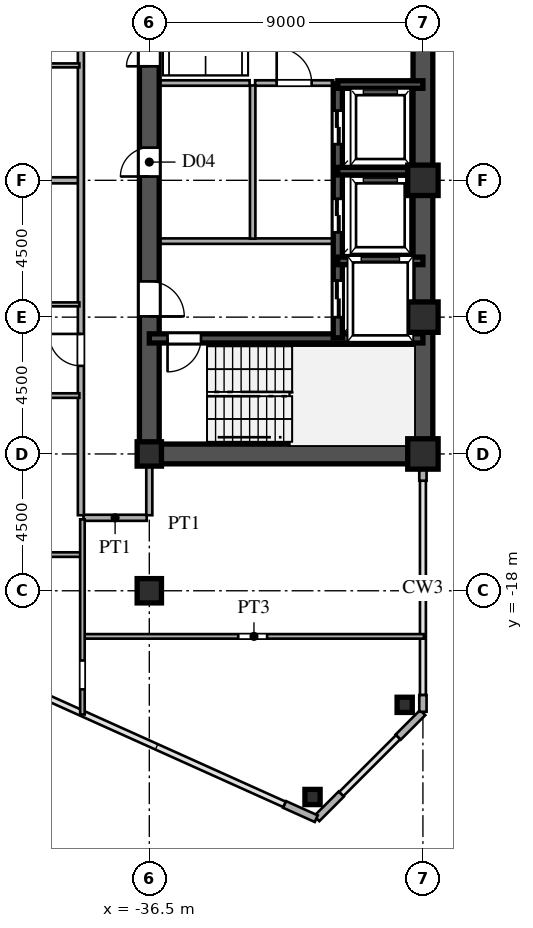
"""IFC4 building model, lengths in metres.
Left out: names, types, materials, properties, quantities, classifications, styles, units other than length and angle.
Written with IfcOpenShell. Run it as: python <this file> out.ifc"""

import sys

from ifc_helpers import new_model, si_unit, direction, frame, frame_2d, origin, origin_2d, place, context, subcontext, project, spatial, rectangle, hollow_rectangle, i_section, extrude, source, transform, mapped, element, fill, save


model = new_model("IFC4")
c1 = context("Model", 3, precision=1e-05, world=origin(), true_north=direction((0.0, 1.0)))
c2 = subcontext(c1, "Body", "Model", "MODEL_VIEW")
j1 = project(units=[si_unit("LENGTHUNIT", "METRE"), si_unit("PLANEANGLEUNIT", "RADIAN")], contexts=[c1])
p1 = place(None, origin())
s1 = spatial("IfcSite", under=j1, at=p1, CompositionType="ELEMENT")
p2 = place(p1, origin())
s2 = spatial("IfcBuilding", under=s1, at=p2, CompositionType="ELEMENT")
p3 = place(p2, frame((0.0, 0.0, 65.7)))
s3 = spatial("IfcBuildingStorey", under=s2, at=p3, CompositionType="ELEMENT", Elevation=65.7)
m1 = source(origin(), c2, "Body", "SweptSolid", [
    extrude(hollow_rectangle(XDim=1.0, YDim=1.0, WallThickness=0.042, at=origin_2d()), origin(), (0.0, 0.0, 1.0), 3.6),
])
for number, where, z_axis, x_axis in (
    (1, (-27.5, -13.5, 0.0), (0.0, 0.0, 1.0), (1.0, 0.0, 0.0)),
    (2, (-27.5, -9.0, 0.0), (0.0, 0.0, 1.0), (1.0, 0.0, 0.0)),
    (3, (-27.5, -4.5, 0.0), (0.0, 0.0, 1.0), (1.0, 0.0, 0.0)),
):
    element("IfcColumn", number, at=place(p3, frame(where, z_axis=z_axis, x_axis=x_axis)), inside=s3, PredefinedType="COLUMN", context=c2, shape_type="MappedRepresentation", body=[
        mapped(m1, transform((0.0, 0.0, 0.0), scale=1.0)),
    ])
m2 = source(origin(), c2, "Body", "SweptSolid", [
    extrude(i_section(OverallWidth=0.8, OverallDepth=0.8, WebThickness=0.032, FlangeThickness=0.05, at=origin_2d()), origin(), (0.0, 0.0, 1.0), 3.6),
])
for number, where, z_axis, x_axis in (
    (4, (-36.5, -18.0, 0.0), (0.0, 0.0, 1.0), (1.0, 0.0, 0.0)),
    (5, (-36.5, -13.5, 0.0), (0.0, 0.0, 1.0), (1.0, 0.0, 0.0)),
):
    element("IfcColumn", number, at=place(p3, frame(where, z_axis=z_axis, x_axis=x_axis)), inside=s3, PredefinedType="COLUMN", context=c2, shape_type="MappedRepresentation", body=[
        mapped(m2, transform((0.0, 0.0, 0.0), scale=1.0)),
    ])
m3 = source(origin(), c2, "Body", "SweptSolid", [
    extrude(hollow_rectangle(XDim=0.5, YDim=0.5, WallThickness=0.02, at=origin_2d()), origin(), (0.0, 0.0, 1.0), 3.6),
])
for number, where, z_axis, x_axis in (
    (6, (-28.1, -21.751, 0.0), (0.0, 0.0, 1.0), (1.0, 0.0, 0.0)),
    (7, (-31.131, -24.783, 0.0), (0.0, 0.0, 1.0), (1.0, 0.0, 0.0)),
):
    element("IfcColumn", number, at=place(p3, frame(where, z_axis=z_axis, x_axis=x_axis)), inside=s3, PredefinedType="COLUMN", context=c2, shape_type="MappedRepresentation", body=[
        mapped(m3, transform((0.0, 0.0, 0.0), scale=1.0)),
    ])
p4 = place(p3, frame((-27.5, -21.98, 0.0), z_axis=(0.0, 0.0, 1.0), x_axis=(0.0, 1.0, 0.0)))
e8 = element("IfcWall", 8, at=p4, inside=s3, PredefinedType="SOLIDWALL", context=c2, shape_type="SweptSolid", body=[
    extrude(rectangle(XDim=0.55, YDim=0.24, at=frame_2d((0.275, 0.0))), origin(), (0.0, 0.0, 1.0), 3.38),
])
p5 = place(p3, frame((-27.5, -14.38, 0.0), z_axis=(0.0, 0.0, 1.0), x_axis=(0.0, 1.0, 0.0)))
e9 = element("IfcWall", 9, at=p5, inside=s3, PredefinedType="SOLIDWALL", context=c2, shape_type="SweptSolid", body=[
    extrude(rectangle(XDim=0.55, YDim=0.24, at=frame_2d((0.275, 0.0))), origin(), (0.0, 0.0, 1.0), 2.88),
])
p6 = place(p3, frame((-32.049, -25.028, 0.0), z_axis=(0.0, 0.0, 1.0), x_axis=(0.911929519623, -0.410346866979, 0.0)))
e10 = element("IfcWall", 10, at=p6, inside=s3, PredefinedType="SOLIDWALL", context=c2, shape_type="SweptSolid", body=[
    extrude(rectangle(XDim=1.14, YDim=0.24, at=frame_2d((0.57, 0.0))), origin(), (0.0, 0.0, 1.0), 3.38),
])
for number, where, z_axis, x_axis in (
    (11, (-30.993, -25.493, 0.0), (0.0, 0.0, 1.0), (0.707, 0.707, 0.0)),
    (12, (-28.313, -22.813, 0.0), (0.0, 0.0, 1.0), (0.707, 0.707, 0.0)),
):
    element("IfcWall", number, at=place(p3, frame(where, z_axis=z_axis, x_axis=x_axis)), inside=s3, PredefinedType="SOLIDWALL", context=c2, shape_type="SweptSolid", body=[
        extrude(rectangle(XDim=1.14, YDim=0.24, at=frame_2d((0.57, 0.0))), origin(), (0.0, 0.0, 1.0), 3.38),
    ])
p7 = place(p3, frame((-27.5, -13.5, 0.0), z_axis=(0.0, 0.0, 1.0), x_axis=(0.0, 1.0, 0.0)))
e13 = element("IfcWall", 13, at=p7, inside=s3, PredefinedType="SHEAR", context=c2, shape_type="SweptSolid", body=[
    extrude(rectangle(XDim=12.2, YDim=0.65, at=frame_2d((6.1, 0.0))), origin(), (0.0, 0.0, 1.0), 3.38),
])
p8 = place(p3, frame((-27.5, -1.3, 0.0), z_axis=(0.0, 0.0, 1.0), x_axis=(0.0, 1.0, 0.0)))
e14 = element("IfcWall", 14, at=p8, inside=s3, PredefinedType="SHEAR", context=c2, shape_type="SweptSolid", body=[
    extrude(rectangle(XDim=2.6, YDim=0.65, at=frame_2d((1.3, 0.0))), origin(), (0.0, 0.0, 1.0), 3.38),
])
p9 = place(p3, frame((-36.5, -13.5, 0.0), z_axis=(0.0, 0.0, 1.0), x_axis=(1.0, 0.0, 0.0)))
e15 = element("IfcWall", 15, at=p9, inside=s3, PredefinedType="SHEAR", context=c2, shape_type="SweptSolid", body=[
    extrude(rectangle(XDim=9.0, YDim=0.65, at=frame_2d((4.5, 0.0))), origin(), (0.0, 0.0, 1.0), 3.38),
])
p10 = place(p3, frame((-36.5, -13.65, 0.0), z_axis=(0.0, 0.0, 1.0), x_axis=(0.0, 1.0, 0.0)))
e16 = element("IfcWall", 16, at=p10, inside=s3, PredefinedType="SHEAR", context=c2, shape_type="SweptSolid", body=[
    extrude(rectangle(XDim=7.15, YDim=0.65, at=frame_2d((3.575, 0.0))), origin(), (0.0, 0.0, 1.0), 3.38),
])
p11 = place(p10, frame((4.675, 0.0, 0.0)))
e17 = element("IfcOpeningElement", 17, at=p11, cuts=e16, PredefinedType="OPENING", context=c2, shape_type="SweptSolid", body=[
    extrude(rectangle(XDim=1.15, YDim=2.2, at=frame_2d((0.575, 1.1))), frame((0.0, 0.335, 0.0), z_axis=(0.0, -1.0, 0.0), x_axis=(1.0, 0.0, 0.0)), (0.0, 0.0, 1.0), 0.67),
])
p12 = place(p3, frame((-36.5, -1.3, 0.0), z_axis=(0.0, 0.0, 1.0), x_axis=(0.0, 1.0, 0.0)))
e18 = element("IfcWall", 18, at=p12, inside=s3, PredefinedType="SHEAR", context=c2, shape_type="SweptSolid", body=[
    extrude(rectangle(XDim=2.6, YDim=0.65, at=frame_2d((1.3, 0.0))), origin(), (0.0, 0.0, 1.0), 3.38),
])
p13 = place(p12, frame((0.55, 0.0, 0.0)))
e19 = element("IfcOpeningElement", 19, at=p13, cuts=e18, PredefinedType="OPENING", context=c2, shape_type="SweptSolid", body=[
    extrude(rectangle(XDim=1.5, YDim=2.3, at=frame_2d((0.75, 1.15))), frame((0.0, 0.335, 0.0), z_axis=(0.0, -1.0, 0.0), x_axis=(1.0, 0.0, 0.0)), (0.0, 0.0, 1.0), 0.67),
])
p14 = place(p3, frame((-36.5, -6.5, 0.0), z_axis=(0.0, 0.0, 1.0), x_axis=(0.0, 1.0, 0.0)))
e20 = element("IfcWall", 20, at=p14, inside=s3, PredefinedType="SHEAR", context=c2, shape_type="SweptSolid", body=[
    extrude(rectangle(XDim=5.2, YDim=0.65, at=frame_2d((2.6, 0.0))), origin(), (0.0, 0.0, 1.0), 3.38),
])
p15 = place(p14, frame((2.125, 0.0, 0.0)))
e21 = element("IfcOpeningElement", 21, at=p15, cuts=e20, PredefinedType="OPENING", context=c2, shape_type="SweptSolid", body=[
    extrude(rectangle(XDim=0.95, YDim=2.15, at=frame_2d((0.475, 1.075))), frame((0.0, 0.335, 0.0), z_axis=(0.0, -1.0, 0.0), x_axis=(1.0, 0.0, 0.0)), (0.0, 0.0, 1.0), 0.67),
])
p16 = place(p3, frame((-36.5, -9.7, 0.0), z_axis=(0.0, 0.0, 1.0), x_axis=(1.0, 0.0, 0.0)))
e22 = element("IfcWall", 22, at=p16, inside=s3, PredefinedType="SHEAR", context=c2, shape_type="SweptSolid", body=[
    extrude(rectangle(XDim=9.0, YDim=0.3, at=frame_2d((4.5, 0.0))), origin(), (0.0, 0.0, 1.0), 3.38),
])
p17 = place(p16, frame((0.6, 0.0, 0.0)))
e23 = element("IfcOpeningElement", 23, at=p17, cuts=e22, PredefinedType="OPENING", context=c2, shape_type="SweptSolid", body=[
    extrude(rectangle(XDim=1.1, YDim=2.2, at=frame_2d((0.55, 1.1))), frame((0.0, 0.16, 0.0), z_axis=(0.0, -1.0, 0.0), x_axis=(1.0, 0.0, 0.0)), (0.0, 0.0, 1.0), 0.32),
])
for number, where, z_axis, x_axis in (
    (24, (-30.3, -7.15, 0.0), (0.0, 0.0, 1.0), (1.0, 0.0, 0.0)),
    (25, (-30.3, -4.2, 0.0), (0.0, 0.0, 1.0), (1.0, 0.0, 0.0)),
    (26, (-30.3, -1.35, 0.0), (0.0, 0.0, 1.0), (1.0, 0.0, 0.0)),
):
    element("IfcWall", number, at=place(p3, frame(where, z_axis=z_axis, x_axis=x_axis)), inside=s3, PredefinedType="SHEAR", context=c2, shape_type="SweptSolid", body=[
        extrude(rectangle(XDim=2.8, YDim=0.25, at=frame_2d((1.4, 0.0))), origin(), (0.0, 0.0, 1.0), 3.38),
    ])
p18 = place(p3, frame((-30.3, -9.68, 0.0), z_axis=(0.0, 0.0, 1.0), x_axis=(0.0, 1.0, 0.0)))
e27 = element("IfcWall", 27, at=p18, inside=s3, PredefinedType="SHEAR", context=c2, shape_type="SweptSolid", body=[
    extrude(rectangle(XDim=2.56, YDim=0.3, at=frame_2d((1.28, 0.0))), origin(), (0.0, 0.0, 1.0), 3.38),
])
p19 = place(p18, frame((0.68, 0.0, 0.0)))
e28 = element("IfcOpeningElement", 28, at=p19, cuts=e27, PredefinedType="OPENING", context=c2, shape_type="SweptSolid", body=[
    extrude(rectangle(XDim=1.2, YDim=2.25, at=frame_2d((0.6, 1.125))), frame((0.0, 0.16, 0.0), z_axis=(0.0, -1.0, 0.0), x_axis=(1.0, 0.0, 0.0)), (0.0, 0.0, 1.0), 0.32),
])
p20 = place(p3, frame((-30.3, -7.12, 0.0), z_axis=(0.0, 0.0, 1.0), x_axis=(0.0, 1.0, 0.0)))
e29 = element("IfcWall", 29, at=p20, inside=s3, PredefinedType="SHEAR", context=c2, shape_type="SweptSolid", body=[
    extrude(rectangle(XDim=2.92, YDim=0.3, at=frame_2d((1.46, 0.0))), origin(), (0.0, 0.0, 1.0), 3.38),
])
p21 = place(p20, frame((0.91, 0.0, 0.0)))
e30 = element("IfcOpeningElement", 30, at=p21, cuts=e29, PredefinedType="OPENING", context=c2, shape_type="SweptSolid", body=[
    extrude(rectangle(XDim=1.1, YDim=2.2, at=frame_2d((0.55, 1.1))), frame((0.0, 0.16, 0.0), z_axis=(0.0, -1.0, 0.0), x_axis=(1.0, 0.0, 0.0)), (0.0, 0.0, 1.0), 0.32),
])
p22 = place(p3, frame((-30.3, -4.2, 0.0), z_axis=(0.0, 0.0, 1.0), x_axis=(0.0, 1.0, 0.0)))
e31 = element("IfcWall", 31, at=p22, inside=s3, PredefinedType="SHEAR", context=c2, shape_type="SweptSolid", body=[
    extrude(rectangle(XDim=2.88, YDim=0.3, at=frame_2d((1.44, 0.0))), origin(), (0.0, 0.0, 1.0), 3.38),
])
p23 = place(p22, frame((0.89, 0.0, 0.0)))
e32 = element("IfcOpeningElement", 32, at=p23, cuts=e31, PredefinedType="OPENING", context=c2, shape_type="SweptSolid", body=[
    extrude(rectangle(XDim=1.1, YDim=2.2, at=frame_2d((0.55, 1.1))), frame((0.0, 0.16, 0.0), z_axis=(0.0, -1.0, 0.0), x_axis=(1.0, 0.0, 0.0)), (0.0, 0.0, 1.0), 0.32),
])
p24 = place(p3, frame((-36.15, -6.5, 0.0), z_axis=(0.0, 0.0, 1.0), x_axis=(1.0, 0.0, 0.0)))
e33 = element("IfcWall", 33, at=p24, inside=s3, PredefinedType="PARTITIONING", context=c2, shape_type="SweptSolid", body=[
    extrude(rectangle(XDim=5.7, YDim=0.18, at=frame_2d((2.85, 0.0))), origin(), (0.0, 0.0, 1.0), 3.38),
])
p25 = place(p3, frame((-33.1, -6.42, 0.0), z_axis=(0.0, 0.0, 1.0), x_axis=(0.0, 1.0, 0.0)))
e34 = element("IfcWall", 34, at=p25, inside=s3, PredefinedType="PARTITIONING", context=c2, shape_type="SweptSolid", body=[
    extrude(rectangle(XDim=5.04, YDim=0.18, at=frame_2d((2.52, 0.0))), origin(), (0.0, 0.0, 1.0), 3.38),
])
p26 = place(p3, frame((-33.02, -1.3, 0.0), z_axis=(0.0, 0.0, 1.0), x_axis=(1.0, 0.0, 0.0)))
e35 = element("IfcWall", 35, at=p26, inside=s3, PredefinedType="PARTITIONING", context=c2, shape_type="SweptSolid", body=[
    extrude(rectangle(XDim=2.57, YDim=0.18, at=frame_2d((1.285, 0.0))), origin(), (0.0, 0.0, 1.0), 3.38),
])
p27 = place(p26, frame((0.71, 0.0, 0.0)))
e36 = element("IfcOpeningElement", 36, at=p27, cuts=e35, PredefinedType="OPENING", context=c2, shape_type="SweptSolid", body=[
    extrude(rectangle(XDim=1.15, YDim=2.2, at=frame_2d((0.575, 1.1))), frame((0.0, 0.1, 0.0), z_axis=(0.0, -1.0, 0.0), x_axis=(1.0, 0.0, 0.0)), (0.0, 0.0, 1.0), 0.2),
])
p28 = place(p3, frame((-36.15, -1.3, 0.0), z_axis=(0.0, 0.0, 1.0), x_axis=(1.0, 0.0, 0.0)))
e37 = element("IfcWall", 37, at=p28, inside=s3, PredefinedType="PARTITIONING", context=c2, shape_type="SweptSolid", body=[
    extrude(rectangle(XDim=2.95, YDim=0.18, at=frame_2d((1.475, 0.0))), origin(), (0.0, 0.0, 1.0), 3.38),
])
p29 = place(p3, frame((-38.65, -19.5, 0.0), z_axis=(0.0, 0.0, 1.0), x_axis=(1.0, 0.0, 0.0)))
e38 = element("IfcWall", 38, at=p29, inside=s3, PredefinedType="PARTITIONING", context=c2, shape_type="SweptSolid", body=[
    extrude(rectangle(XDim=11.185, YDim=0.15, at=frame_2d((5.592, 0.0))), origin(), (0.0, 0.0, 1.0), 3.38),
])
p30 = place(p29, frame((5.075, 0.0, 0.0)))
e39 = element("IfcOpeningElement", 39, at=p30, cuts=e38, PredefinedType="OPENING", context=c2, shape_type="SweptSolid", body=[
    extrude(rectangle(XDim=0.95, YDim=2.15, at=frame_2d((0.475, 1.075))), frame((0.0, 0.085, 0.0), z_axis=(0.0, -1.0, 0.0), x_axis=(1.0, 0.0, 0.0)), (0.0, 0.0, 1.0), 0.17),
])
p31 = place(p3, frame((-43.8, -16.81, 0.0), z_axis=(0.0, 0.0, 1.0), x_axis=(1.0, 0.0, 0.0)))
e40 = element("IfcWall", 40, at=p31, inside=s3, PredefinedType="PARTITIONING", context=c2, shape_type="SweptSolid", body=[
    extrude(rectangle(XDim=5.05, YDim=0.15, at=frame_2d((2.525, 0.0))), origin(), (0.0, 0.0, 1.0), 3.38),
])
p32 = place(p3, frame((-38.665, -15.6, 0.0), z_axis=(0.0, 0.0, 1.0), x_axis=(1.0, 0.0, 0.0)))
e41 = element("IfcWall", 41, at=p32, inside=s3, PredefinedType="PARTITIONING", context=c2, shape_type="SweptSolid", body=[
    extrude(rectangle(XDim=2.08, YDim=0.2, at=frame_2d((1.04, 0.0))), origin(), (0.0, 0.0, 1.0), 3.38),
])
p33 = place(p3, frame((-43.8, -11.58, 0.0), z_axis=(0.0, 0.0, 1.0), x_axis=(1.0, 0.0, 0.0)))
e42 = element("IfcWall", 42, at=p33, inside=s3, PredefinedType="PARTITIONING", context=c2, shape_type="SweptSolid", body=[
    extrude(rectangle(XDim=5.0, YDim=0.15, at=frame_2d((2.5, 0.0))), origin(), (0.0, 0.0, 1.0), 3.38),
])
p34 = place(p33, frame((2.025, 0.0, 0.0)))
e43 = element("IfcOpeningElement", 43, at=p34, cuts=e42, PredefinedType="OPENING", context=c2, shape_type="SweptSolid", body=[
    extrude(rectangle(XDim=0.95, YDim=2.15, at=frame_2d((0.475, 1.075))), frame((0.0, 0.085, 0.0), z_axis=(0.0, -1.0, 0.0), x_axis=(1.0, 0.0, 0.0)), (0.0, 0.0, 1.0), 0.17),
])
p35 = place(p3, frame((-43.8, -8.58, 0.0), z_axis=(0.0, 0.0, 1.0), x_axis=(1.0, 0.0, 0.0)))
e44 = element("IfcWall", 44, at=p35, inside=s3, PredefinedType="PARTITIONING", context=c2, shape_type="SweptSolid", body=[
    extrude(rectangle(XDim=5.0, YDim=0.13, at=frame_2d((2.5, 0.0))), origin(), (0.0, 0.0, 1.0), 3.38),
])
p36 = place(p35, frame((2.06, 0.0, 0.0)))
e45 = element("IfcOpeningElement", 45, at=p36, cuts=e44, PredefinedType="OPENING", context=c2, shape_type="SweptSolid", body=[
    extrude(rectangle(XDim=0.88, YDim=2.1, at=frame_2d((0.44, 1.05))), frame((0.0, 0.075, 0.0), z_axis=(0.0, -1.0, 0.0), x_axis=(1.0, 0.0, 0.0)), (0.0, 0.0, 1.0), 0.15),
])
p37 = place(p3, frame((-54.52, -4.5, 0.0), z_axis=(0.0, 0.0, 1.0), x_axis=(1.0, 0.0, 0.0)))
e46 = element("IfcWall", 46, at=p37, inside=s3, PredefinedType="PARTITIONING", context=c2, shape_type="SweptSolid", body=[
    extrude(rectangle(XDim=15.69, YDim=0.2, at=frame_2d((7.845, 0.0))), origin(), (0.0, 0.0, 1.0), 2.68),
])
p38 = place(p3, frame((-43.8, -0.72, 0.0), z_axis=(0.0, 0.0, 1.0), x_axis=(1.0, 0.0, 0.0)))
e47 = element("IfcWall", 47, at=p38, inside=s3, PredefinedType="PARTITIONING", context=c2, shape_type="SweptSolid", body=[
    extrude(rectangle(XDim=5.0, YDim=0.13, at=frame_2d((2.5, 0.0))), origin(), (0.0, 0.0, 1.0), 3.38),
])
p39 = place(p38, frame((2.06, 0.0, 0.0)))
e48 = element("IfcOpeningElement", 48, at=p39, cuts=e47, PredefinedType="OPENING", context=c2, shape_type="SweptSolid", body=[
    extrude(rectangle(XDim=0.88, YDim=2.1, at=frame_2d((0.44, 1.05))), frame((0.0, 0.075, 0.0), z_axis=(0.0, -1.0, 0.0), x_axis=(1.0, 0.0, 0.0)), (0.0, 0.0, 1.0), 0.15),
])
p40 = place(p3, frame((-38.75, -15.515, 0.0), z_axis=(0.0, 0.0, 1.0), x_axis=(0.0, 1.0, 0.0)))
e49 = element("IfcWall", 49, at=p40, inside=s3, PredefinedType="PARTITIONING", context=c2, shape_type="SweptSolid", body=[
    extrude(rectangle(XDim=31.03, YDim=0.2, at=frame_2d((15.515, 0.0))), origin(), (0.0, 0.0, 1.0), 3.38),
])
p41 = place(p40, frame((4.913, 0.0, 0.0)))
e50 = element("IfcOpeningElement", 50, at=p41, cuts=e49, PredefinedType="OPENING", context=c2, shape_type="SweptSolid", body=[
    extrude(rectangle(XDim=1.05, YDim=2.25, at=frame_2d((0.525, 1.125))), frame((0.0, 0.11, 0.0), z_axis=(0.0, -1.0, 0.0), x_axis=(1.0, 0.0, 0.0)), (0.0, 0.0, 1.0), 0.22),
])
p42 = place(p40, frame((17.28, 0.0, 0.0)))
e51 = element("IfcOpeningElement", 51, at=p42, cuts=e49, PredefinedType="OPENING", context=c2, shape_type="SweptSolid", body=[
    extrude(rectangle(XDim=1.05, YDim=2.25, at=frame_2d((0.525, 1.125))), frame((0.0, 0.11, 0.0), z_axis=(0.0, -1.0, 0.0), x_axis=(1.0, 0.0, 0.0)), (0.0, 0.0, 1.0), 0.22),
])
p43 = place(p40, frame((27.54, 0.0, 0.0)))
e52 = element("IfcOpeningElement", 52, at=p43, cuts=e49, PredefinedType="OPENING", context=c2, shape_type="SweptSolid", body=[
    extrude(rectangle(XDim=1.05, YDim=2.25, at=frame_2d((0.525, 1.125))), frame((0.0, 0.11, 0.0), z_axis=(0.0, -1.0, 0.0), x_axis=(1.0, 0.0, 0.0)), (0.0, 0.0, 1.0), 0.22),
])
p44 = place(p3, frame((-38.7, -22.07, 0.0), z_axis=(0.0, 0.0, 1.0), x_axis=(0.0, 1.0, 0.0)))
e53 = element("IfcWall", 53, at=p44, inside=s3, PredefinedType="PARTITIONING", context=c2, shape_type="SweptSolid", body=[
    extrude(rectangle(XDim=6.42, YDim=0.15, at=frame_2d((3.21, 0.0))), origin(), (0.0, 0.0, 1.0), 3.38),
])
p45 = place(p44, frame((0.827, 0.0, 0.0)))
e54 = element("IfcOpeningElement", 54, at=p45, cuts=e53, PredefinedType="OPENING", context=c2, shape_type="SweptSolid", body=[
    extrude(rectangle(XDim=0.95, YDim=2.15, at=frame_2d((0.475, 1.075))), frame((0.0, 0.085, 0.0), z_axis=(0.0, -1.0, 0.0), x_axis=(1.0, 0.0, 0.0)), (0.0, 0.0, 1.0), 0.17),
])
p46 = place(p3, frame((-36.5, -15.515, 0.0), z_axis=(0.0, 0.0, 1.0), x_axis=(0.0, 1.0, 0.0)))
e55 = element("IfcWall", 55, at=p46, inside=s3, PredefinedType="PARTITIONING", context=c2, shape_type="SweptSolid", body=[
    extrude(rectangle(XDim=1.685, YDim=0.2, at=frame_2d((0.842, 0.0))), origin(), (0.0, 0.0, 1.0), 2.68),
])
m4 = source(origin(), c2, "Body", "SweptSolid", [
    extrude(rectangle(XDim=1.15, YDim=2.2, at=frame_2d((0.575, 1.1))), frame((0.0, 0.025, 0.0), z_axis=(0.0, -1.0, 0.0), x_axis=(1.0, 0.0, 0.0)), (0.0, 0.0, 1.0), 0.05),
])
p47 = place(p11, frame((1.15, 0.0, 0.0), z_axis=(0.0, 0.0, 1.0), x_axis=(-1.0, 0.0, 0.0)))
e56 = element("IfcDoor", 56, at=p47, inside=s3, OperationType="SINGLE_SWING_LEFT", PredefinedType="DOOR", context=c2, shape_type="MappedRepresentation", body=[
    mapped(m4, transform((0.0, 0.0, 0.0), scale=1.0)),
])
fill(e17, e56)
m5 = source(origin(), c2, "Body", "SweptSolid", [
    extrude(rectangle(XDim=1.5, YDim=2.3, at=frame_2d((0.75, 1.15))), frame((0.0, 0.025, 0.0), z_axis=(0.0, -1.0, 0.0), x_axis=(1.0, 0.0, 0.0)), (0.0, 0.0, 1.0), 0.05),
])
p48 = place(p13, origin())
e57 = element("IfcDoor", 57, at=p48, inside=s3, OperationType="DOUBLE_SWING_LEFT", PredefinedType="DOOR", context=c2, shape_type="MappedRepresentation", body=[
    mapped(m5, transform((0.0, 0.0, 0.0), scale=1.0)),
])
fill(e19, e57)
m6 = source(origin(), c2, "Body", "SweptSolid", [
    extrude(rectangle(XDim=0.95, YDim=2.15, at=frame_2d((0.475, 1.075))), frame((0.0, 0.025, 0.0), z_axis=(0.0, -1.0, 0.0), x_axis=(1.0, 0.0, 0.0)), (0.0, 0.0, 1.0), 0.05),
])
p49 = place(p15, origin())
e58 = element("IfcDoor", 58, at=p49, inside=s3, OperationType="SINGLE_SWING_LEFT", PredefinedType="DOOR", context=c2, shape_type="MappedRepresentation", body=[
    mapped(m6, transform((0.0, 0.0, 0.0), scale=1.0)),
])
fill(e21, e58)
m7 = source(origin(), c2, "Body", "SweptSolid", [
    extrude(rectangle(XDim=1.1, YDim=2.2, at=frame_2d((0.55, 1.1))), frame((0.0, 0.025, 0.0), z_axis=(0.0, -1.0, 0.0), x_axis=(1.0, 0.0, 0.0)), (0.0, 0.0, 1.0), 0.05),
])
p50 = place(p17, frame((1.1, 0.0, 0.0), z_axis=(0.0, 0.0, 1.0), x_axis=(-1.0, 0.0, 0.0)))
e59 = element("IfcDoor", 59, at=p50, inside=s3, OperationType="SINGLE_SWING_LEFT", PredefinedType="DOOR", context=c2, shape_type="MappedRepresentation", body=[
    mapped(m7, transform((0.0, 0.0, 0.0), scale=1.0)),
])
fill(e23, e59)
m8 = source(origin(), c2, "Body", "SweptSolid", [
    extrude(rectangle(XDim=1.2, YDim=2.25, at=frame_2d((0.6, 1.125))), frame((0.0, 0.025, 0.0), z_axis=(0.0, -1.0, 0.0), x_axis=(1.0, 0.0, 0.0)), (0.0, 0.0, 1.0), 0.05),
])
p51 = place(p19, origin())
e60 = element("IfcDoor", 60, at=p51, inside=s3, OperationType="DOUBLE_DOOR_SLIDING", PredefinedType="DOOR", context=c2, shape_type="MappedRepresentation", body=[
    mapped(m8, transform((0.0, 0.0, 0.0), scale=1.0)),
])
fill(e28, e60)
m9 = source(origin(), c2, "Body", "SweptSolid", [
    extrude(rectangle(XDim=1.1, YDim=2.2, at=frame_2d((0.55, 1.1))), frame((0.0, 0.025, 0.0), z_axis=(0.0, -1.0, 0.0), x_axis=(1.0, 0.0, 0.0)), (0.0, 0.0, 1.0), 0.05),
])
p52 = place(p21, origin())
e61 = element("IfcDoor", 61, at=p52, inside=s3, OperationType="DOUBLE_DOOR_SLIDING", PredefinedType="DOOR", context=c2, shape_type="MappedRepresentation", body=[
    mapped(m9, transform((0.0, 0.0, 0.0), scale=1.0)),
])
fill(e30, e61)
p53 = place(p23, origin())
e62 = element("IfcDoor", 62, at=p53, inside=s3, OperationType="DOUBLE_DOOR_SLIDING", PredefinedType="DOOR", context=c2, shape_type="MappedRepresentation", body=[
    mapped(m9, transform((0.0, 0.0, 0.0), scale=1.0)),
])
fill(e32, e62)
p54 = place(p27, origin())
e63 = element("IfcDoor", 63, at=p54, inside=s3, OperationType="SINGLE_SWING_LEFT", PredefinedType="DOOR", context=c2, shape_type="MappedRepresentation", body=[
    mapped(m4, transform((0.0, 0.0, 0.0), scale=1.0)),
])
fill(e36, e63)
m10 = source(origin(), c2, "Body", "SweptSolid", [
    extrude(rectangle(XDim=1.05, YDim=2.25, at=frame_2d((0.525, 1.125))), frame((0.0, 0.025, 0.0), z_axis=(0.0, -1.0, 0.0), x_axis=(1.0, 0.0, 0.0)), (0.0, 0.0, 1.0), 0.05),
])
p55 = place(p41, origin())
e64 = element("IfcDoor", 64, at=p55, inside=s3, OperationType="SINGLE_SWING_RIGHT", PredefinedType="DOOR", context=c2, shape_type="MappedRepresentation", body=[
    mapped(m10, transform((0.0, 0.0, 0.0), scale=1.0)),
])
fill(e50, e64)
save(model, sys.argv[1])
